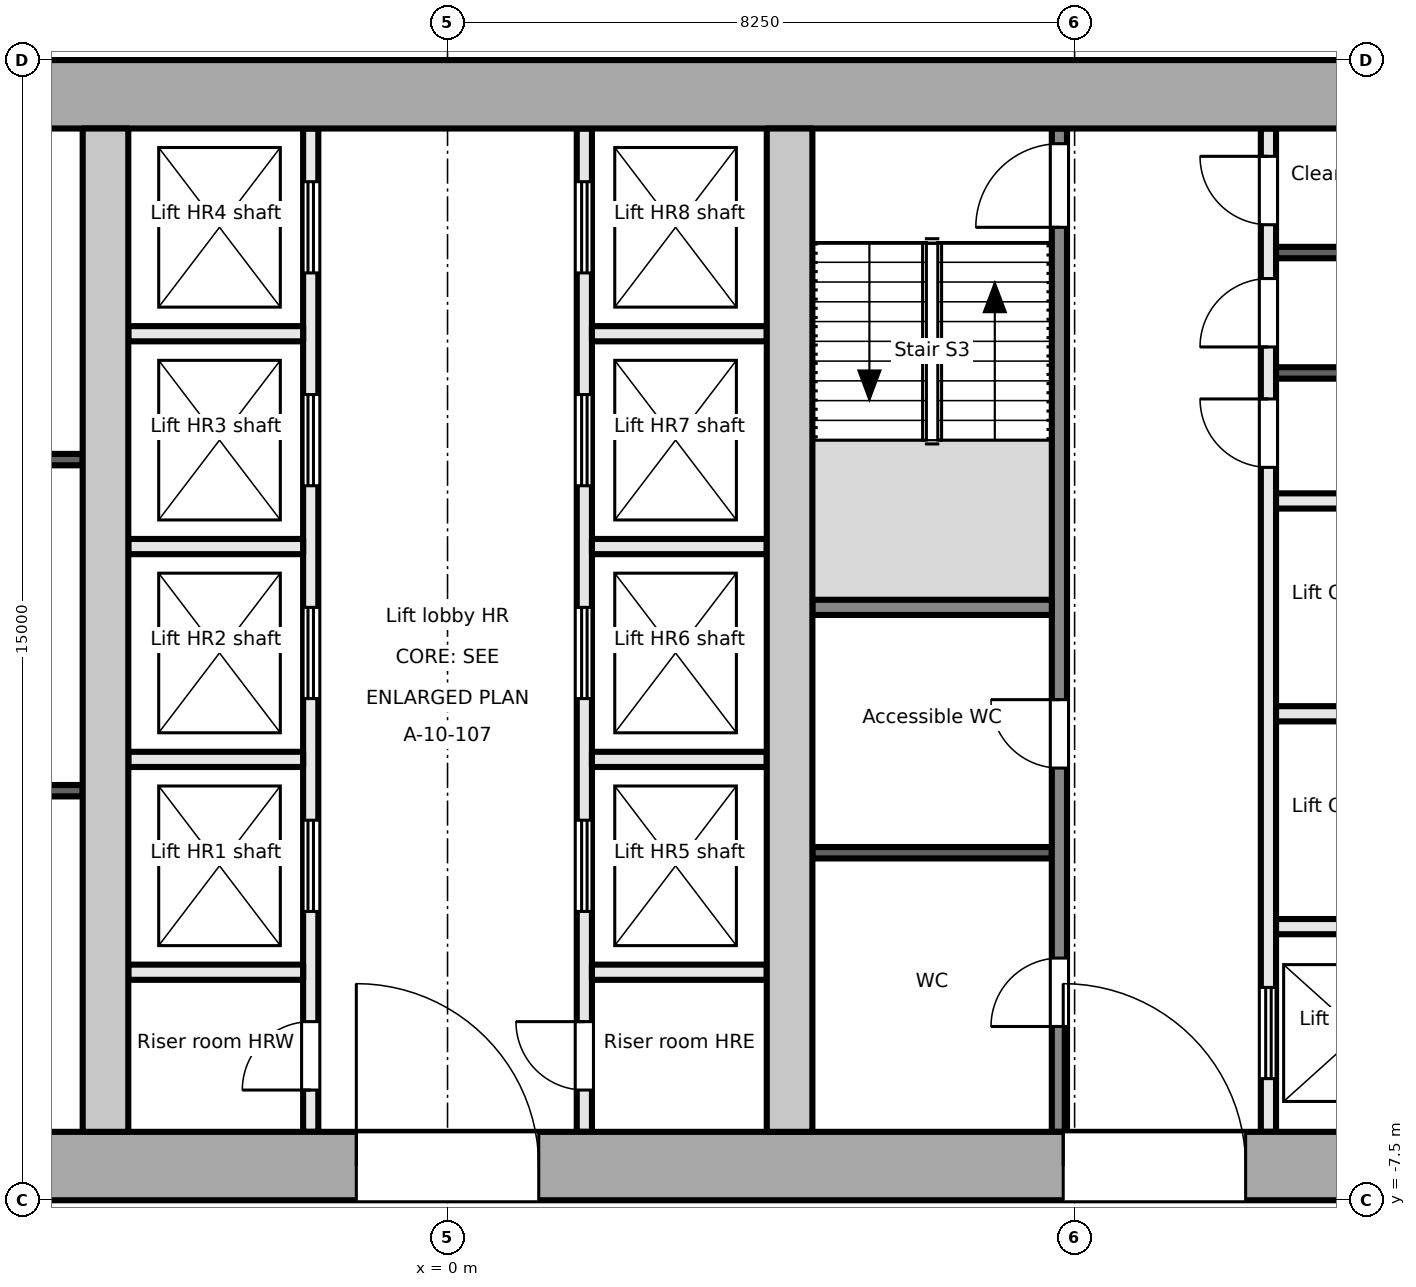
"""IFC4 building model, lengths in metres.
Left out: names, types, materials, properties, quantities, classifications, styles, units other than length and angle.
Written with IfcOpenShell. Run it as: python <this file> out.ifc"""

import sys

from ifc_helpers import new_model, si_unit, direction, frame, frame_2d, origin, place, context, subcontext, project, spatial, rectangle, extrude, element, fill, save


model = new_model("IFC4")
c1 = context("Model", 3, precision=1e-05, world=origin(), true_north=direction((0.0, 1.0)))
c2 = subcontext(c1, "Body", "Model", "MODEL_VIEW")
j1 = project(units=[si_unit("LENGTHUNIT", "METRE"), si_unit("PLANEANGLEUNIT", "RADIAN")], contexts=[c1])
p1 = place(None, origin())
s1 = spatial("IfcSite", under=j1, at=p1, CompositionType="ELEMENT")
p2 = place(p1, origin())
s2 = spatial("IfcBuilding", under=s1, at=p2, CompositionType="ELEMENT")
p3 = place(p2, frame((0.0, 0.0, 213.5)))
s3 = spatial("IfcBuildingStorey", under=s2, at=p3, CompositionType="ELEMENT", Elevation=213.5)
p4 = place(p3, frame((-18.0, -7.05, -0.2), z_axis=(0.0, 0.0, 1.0), x_axis=(1.0, 0.0, 0.0)))
e1 = element("IfcWall", 1, at=p4, inside=s3, PredefinedType="SHEAR", context=c2, shape_type="SweptSolid", body=[
    extrude(rectangle(XDim=36.0, YDim=0.9, at=frame_2d((18.0, 0.0))), origin(), (0.0, 0.0, 1.0), 3.9),
])
p5 = place(p4, frame((4.9, 0.0, 0.2)))
e2 = element("IfcOpeningElement", 2, at=p5, cuts=e1, PredefinedType="OPENING", context=c2, shape_type="SweptSolid", body=[
    extrude(rectangle(XDim=1.8, YDim=2.1, at=frame_2d((0.9, 1.05))), frame((0.0, 0.46, 0.0), z_axis=(0.0, -1.0, 0.0), x_axis=(1.0, 0.0, 0.0)), (0.0, 0.0, 1.0), 0.921),
])
p6 = place(p4, frame((16.8, 0.0, 0.2)))
e3 = element("IfcOpeningElement", 3, at=p6, cuts=e1, PredefinedType="OPENING", context=c2, shape_type="SweptSolid", body=[
    extrude(rectangle(XDim=2.4, YDim=2.1, at=frame_2d((1.2, 1.05))), frame((0.0, 0.46, 0.0), z_axis=(0.0, -1.0, 0.0), x_axis=(1.0, 0.0, 0.0)), (0.0, 0.0, 1.0), 0.921),
])
p7 = place(p4, frame((26.1, 0.0, 0.2)))
e4 = element("IfcOpeningElement", 4, at=p7, cuts=e1, PredefinedType="OPENING", context=c2, shape_type="SweptSolid", body=[
    extrude(rectangle(XDim=2.4, YDim=2.1, at=frame_2d((1.2, 1.05))), frame((0.0, 0.46, 0.0), z_axis=(0.0, -1.0, 0.0), x_axis=(1.0, 0.0, 0.0)), (0.0, 0.0, 1.0), 0.921),
])
p8 = place(p3, frame((-18.0, 7.05, -0.2), z_axis=(0.0, 0.0, 1.0), x_axis=(1.0, 0.0, 0.0)))
e5 = element("IfcWall", 5, at=p8, inside=s3, PredefinedType="SHEAR", context=c2, shape_type="SweptSolid", body=[
    extrude(rectangle(XDim=36.0, YDim=0.9, at=frame_2d((18.0, 0.0))), origin(), (0.0, 0.0, 1.0), 3.9),
])
for number, where, z_axis, x_axis in (
    (6, (-4.5, -6.6, -0.2), (0.0, 0.0, 1.0), (0.0, 1.0, 0.0)),
    (7, (4.5, -6.6, -0.2), (0.0, 0.0, 1.0), (0.0, 1.0, 0.0)),
):
    element("IfcWall", number, at=place(p3, frame(where, z_axis=z_axis, x_axis=x_axis)), inside=s3, PredefinedType="SHEAR", context=c2, shape_type="SweptSolid", body=[
        extrude(rectangle(XDim=13.2, YDim=0.6, at=frame_2d((6.6, 0.0))), origin(), (0.0, 0.0, 1.0), 3.9),
    ])
for number, where, z_axis, x_axis in (
    (8, (-11.05, -2.112, 0.0), (0.0, 0.0, 1.0), (1.0, 0.0, 0.0)),
    (9, (-11.05, 2.244, 0.0), (0.0, 0.0, 1.0), (1.0, 0.0, 0.0)),
):
    element("IfcWall", number, at=place(p3, frame(where, z_axis=z_axis, x_axis=x_axis)), inside=s3, PredefinedType="PARTITIONING", context=c2, shape_type="SweptSolid", body=[
        extrude(rectangle(XDim=6.25, YDim=0.15, at=frame_2d((3.125, 0.0))), origin(), (0.0, 0.0, 1.0), 3.7),
    ])
p9 = place(p3, frame((-1.8, -6.6, 0.0), z_axis=(0.0, 0.0, 1.0), x_axis=(0.0, 1.0, 0.0)))
e10 = element("IfcWall", 10, at=p9, inside=s3, PredefinedType="PARTITIONING", context=c2, shape_type="SweptSolid", body=[
    extrude(rectangle(XDim=13.2, YDim=0.2, at=frame_2d((6.6, 0.0))), origin(), (0.0, 0.0, 1.0), 3.7),
])
p10 = place(p9, frame((0.55, 0.0, 0.0)))
e11 = element("IfcOpeningElement", 11, at=p10, cuts=e10, PredefinedType="OPENING", context=c2, shape_type="SweptSolid", body=[
    extrude(rectangle(XDim=0.9, YDim=2.1, at=frame_2d((0.45, 1.05))), frame((0.0, 0.111, 0.0), z_axis=(0.0, -1.0, 0.0), x_axis=(1.0, 0.0, 0.0)), (0.0, 0.0, 1.0), 0.221),
])
p11 = place(p9, frame((2.9, 0.0, 0.0)))
e12 = element("IfcOpeningElement", 12, at=p11, cuts=e10, PredefinedType="OPENING", context=c2, shape_type="SweptSolid", body=[
    extrude(rectangle(XDim=1.2, YDim=2.1, at=frame_2d((0.6, 1.05))), frame((0.0, 0.111, 0.0), z_axis=(0.0, -1.0, 0.0), x_axis=(1.0, 0.0, 0.0)), (0.0, 0.0, 1.0), 0.221),
])
p12 = place(p9, frame((5.7, 0.0, 0.0)))
e13 = element("IfcOpeningElement", 13, at=p12, cuts=e10, PredefinedType="OPENING", context=c2, shape_type="SweptSolid", body=[
    extrude(rectangle(XDim=1.2, YDim=2.1, at=frame_2d((0.6, 1.05))), frame((0.0, 0.111, 0.0), z_axis=(0.0, -1.0, 0.0), x_axis=(1.0, 0.0, 0.0)), (0.0, 0.0, 1.0), 0.221),
])
p13 = place(p9, frame((8.5, 0.0, 0.0)))
e14 = element("IfcOpeningElement", 14, at=p13, cuts=e10, PredefinedType="OPENING", context=c2, shape_type="SweptSolid", body=[
    extrude(rectangle(XDim=1.2, YDim=2.1, at=frame_2d((0.6, 1.05))), frame((0.0, 0.111, 0.0), z_axis=(0.0, -1.0, 0.0), x_axis=(1.0, 0.0, 0.0)), (0.0, 0.0, 1.0), 0.221),
])
p14 = place(p9, frame((11.3, 0.0, 0.0)))
e15 = element("IfcOpeningElement", 15, at=p14, cuts=e10, PredefinedType="OPENING", context=c2, shape_type="SweptSolid", body=[
    extrude(rectangle(XDim=1.2, YDim=2.1, at=frame_2d((0.6, 1.05))), frame((0.0, 0.111, 0.0), z_axis=(0.0, -1.0, 0.0), x_axis=(1.0, 0.0, 0.0)), (0.0, 0.0, 1.0), 0.221),
])
p15 = place(p3, frame((1.8, -6.6, 0.0), z_axis=(0.0, 0.0, 1.0), x_axis=(0.0, 1.0, 0.0)))
e16 = element("IfcWall", 16, at=p15, inside=s3, PredefinedType="PARTITIONING", context=c2, shape_type="SweptSolid", body=[
    extrude(rectangle(XDim=13.2, YDim=0.2, at=frame_2d((6.6, 0.0))), origin(), (0.0, 0.0, 1.0), 3.7),
])
p16 = place(p15, frame((0.55, 0.0, 0.0)))
e17 = element("IfcOpeningElement", 17, at=p16, cuts=e16, PredefinedType="OPENING", context=c2, shape_type="SweptSolid", body=[
    extrude(rectangle(XDim=0.9, YDim=2.1, at=frame_2d((0.45, 1.05))), frame((0.0, 0.111, 0.0), z_axis=(0.0, -1.0, 0.0), x_axis=(1.0, 0.0, 0.0)), (0.0, 0.0, 1.0), 0.221),
])
p17 = place(p15, frame((2.9, 0.0, 0.0)))
e18 = element("IfcOpeningElement", 18, at=p17, cuts=e16, PredefinedType="OPENING", context=c2, shape_type="SweptSolid", body=[
    extrude(rectangle(XDim=1.2, YDim=2.1, at=frame_2d((0.6, 1.05))), frame((0.0, 0.111, 0.0), z_axis=(0.0, -1.0, 0.0), x_axis=(1.0, 0.0, 0.0)), (0.0, 0.0, 1.0), 0.221),
])
p18 = place(p15, frame((5.7, 0.0, 0.0)))
e19 = element("IfcOpeningElement", 19, at=p18, cuts=e16, PredefinedType="OPENING", context=c2, shape_type="SweptSolid", body=[
    extrude(rectangle(XDim=1.2, YDim=2.1, at=frame_2d((0.6, 1.05))), frame((0.0, 0.111, 0.0), z_axis=(0.0, -1.0, 0.0), x_axis=(1.0, 0.0, 0.0)), (0.0, 0.0, 1.0), 0.221),
])
p19 = place(p15, frame((8.5, 0.0, 0.0)))
e20 = element("IfcOpeningElement", 20, at=p19, cuts=e16, PredefinedType="OPENING", context=c2, shape_type="SweptSolid", body=[
    extrude(rectangle(XDim=1.2, YDim=2.1, at=frame_2d((0.6, 1.05))), frame((0.0, 0.111, 0.0), z_axis=(0.0, -1.0, 0.0), x_axis=(1.0, 0.0, 0.0)), (0.0, 0.0, 1.0), 0.221),
])
p20 = place(p15, frame((11.3, 0.0, 0.0)))
e21 = element("IfcOpeningElement", 21, at=p20, cuts=e16, PredefinedType="OPENING", context=c2, shape_type="SweptSolid", body=[
    extrude(rectangle(XDim=1.2, YDim=2.1, at=frame_2d((0.6, 1.05))), frame((0.0, 0.111, 0.0), z_axis=(0.0, -1.0, 0.0), x_axis=(1.0, 0.0, 0.0)), (0.0, 0.0, 1.0), 0.221),
])
for number, where, z_axis, x_axis in (
    (22, (-4.2, -1.7, 0.0), (0.0, 0.0, 1.0), (1.0, 0.0, 0.0)),
    (23, (-4.2, 1.1, 0.0), (0.0, 0.0, 1.0), (1.0, 0.0, 0.0)),
    (24, (-4.2, 3.9, 0.0), (0.0, 0.0, 1.0), (1.0, 0.0, 0.0)),
    (25, (-4.2, -4.5, 0.0), (0.0, 0.0, 1.0), (1.0, 0.0, 0.0)),
    (26, (1.9, -1.7, 0.0), (0.0, 0.0, 1.0), (1.0, 0.0, 0.0)),
    (27, (1.9, 1.1, 0.0), (0.0, 0.0, 1.0), (1.0, 0.0, 0.0)),
    (28, (1.9, 3.9, 0.0), (0.0, 0.0, 1.0), (1.0, 0.0, 0.0)),
    (29, (1.9, -4.5, 0.0), (0.0, 0.0, 1.0), (1.0, 0.0, 0.0)),
):
    element("IfcWall", number, at=place(p3, frame(where, z_axis=z_axis, x_axis=x_axis)), inside=s3, PredefinedType="PARTITIONING", context=c2, shape_type="SweptSolid", body=[
        extrude(rectangle(XDim=2.3, YDim=0.2, at=frame_2d((1.15, 0.0))), origin(), (0.0, 0.0, 1.0), 3.7),
    ])
p21 = place(p3, frame((8.05, -6.6, 0.0), z_axis=(0.0, 0.0, 1.0), x_axis=(0.0, 1.0, 0.0)))
e30 = element("IfcWall", 30, at=p21, inside=s3, PredefinedType="PARTITIONING", context=c2, shape_type="SweptSolid", body=[
    extrude(rectangle(XDim=13.2, YDim=0.2, at=frame_2d((6.6, 0.0))), origin(), (0.0, 0.0, 1.0), 3.7),
])
p22 = place(p21, frame((1.386, 0.0, 0.0)))
e31 = element("IfcOpeningElement", 31, at=p22, cuts=e30, PredefinedType="OPENING", context=c2, shape_type="SweptSolid", body=[
    extrude(rectangle(XDim=0.9, YDim=2.1, at=frame_2d((0.45, 1.05))), frame((0.0, 0.111, 0.0), z_axis=(0.0, -1.0, 0.0), x_axis=(1.0, 0.0, 0.0)), (0.0, 0.0, 1.0), 0.221),
])
p23 = place(p21, frame((4.786, 0.0, 0.0)))
e32 = element("IfcOpeningElement", 32, at=p23, cuts=e30, PredefinedType="OPENING", context=c2, shape_type="SweptSolid", body=[
    extrude(rectangle(XDim=0.9, YDim=2.1, at=frame_2d((0.45, 1.05))), frame((0.0, 0.111, 0.0), z_axis=(0.0, -1.0, 0.0), x_axis=(1.0, 0.0, 0.0)), (0.0, 0.0, 1.0), 0.221),
])
p24 = place(p21, frame((11.9, 0.0, 0.0)))
e33 = element("IfcOpeningElement", 33, at=p24, cuts=e30, PredefinedType="OPENING", context=c2, shape_type="SweptSolid", body=[
    extrude(rectangle(XDim=1.1, YDim=2.1, at=frame_2d((0.55, 1.05))), frame((0.0, 0.111, 0.0), z_axis=(0.0, -1.0, 0.0), x_axis=(1.0, 0.0, 0.0)), (0.0, 0.0, 1.0), 0.221),
])
p25 = place(p3, frame((10.8, -6.6, 0.0), z_axis=(0.0, 0.0, 1.0), x_axis=(0.0, 1.0, 0.0)))
e34 = element("IfcWall", 34, at=p25, inside=s3, PredefinedType="PARTITIONING", context=c2, shape_type="SweptSolid", body=[
    extrude(rectangle(XDim=13.2, YDim=0.2, at=frame_2d((6.6, 0.0))), origin(), (0.0, 0.0, 1.0), 3.7),
])
p26 = place(p25, frame((0.7, 0.0, 0.0)))
e35 = element("IfcOpeningElement", 35, at=p26, cuts=e34, PredefinedType="OPENING", context=c2, shape_type="SweptSolid", body=[
    extrude(rectangle(XDim=1.2, YDim=2.1, at=frame_2d((0.6, 1.05))), frame((0.0, 0.111, 0.0), z_axis=(0.0, -1.0, 0.0), x_axis=(1.0, 0.0, 0.0)), (0.0, 0.0, 1.0), 0.221),
])
p27 = place(p25, frame((8.742, 0.0, 0.0)))
e36 = element("IfcOpeningElement", 36, at=p27, cuts=e34, PredefinedType="OPENING", context=c2, shape_type="SweptSolid", body=[
    extrude(rectangle(XDim=0.9, YDim=2.1, at=frame_2d((0.45, 1.05))), frame((0.0, 0.111, 0.0), z_axis=(0.0, -1.0, 0.0), x_axis=(1.0, 0.0, 0.0)), (0.0, 0.0, 1.0), 0.221),
])
p28 = place(p25, frame((10.326, 0.0, 0.0)))
e37 = element("IfcOpeningElement", 37, at=p28, cuts=e34, PredefinedType="OPENING", context=c2, shape_type="SweptSolid", body=[
    extrude(rectangle(XDim=0.9, YDim=2.1, at=frame_2d((0.45, 1.05))), frame((0.0, 0.111, 0.0), z_axis=(0.0, -1.0, 0.0), x_axis=(1.0, 0.0, 0.0)), (0.0, 0.0, 1.0), 0.221),
])
p29 = place(p25, frame((11.934, 0.0, 0.0)))
e38 = element("IfcOpeningElement", 38, at=p29, cuts=e34, PredefinedType="OPENING", context=c2, shape_type="SweptSolid", body=[
    extrude(rectangle(XDim=0.9, YDim=2.1, at=frame_2d((0.45, 1.05))), frame((0.0, 0.111, 0.0), z_axis=(0.0, -1.0, 0.0), x_axis=(1.0, 0.0, 0.0)), (0.0, 0.0, 1.0), 0.221),
])
p30 = place(p3, frame((4.8, 0.3, 0.0), z_axis=(0.0, 0.0, 1.0), x_axis=(1.0, 0.0, 0.0)))
e39 = element("IfcWall", 39, at=p30, inside=s3, PredefinedType="PARTITIONING", context=c2, shape_type="SweptSolid", body=[
    extrude(rectangle(XDim=3.15, YDim=0.2, at=frame_2d((1.575, 0.0))), origin(), (0.0, 0.0, 1.0), 3.7),
])
p31 = place(p3, frame((4.8, -2.928, 0.0), z_axis=(0.0, 0.0, 1.0), x_axis=(1.0, 0.0, 0.0)))
e40 = element("IfcWall", 40, at=p31, inside=s3, PredefinedType="PARTITIONING", context=c2, shape_type="SweptSolid", body=[
    extrude(rectangle(XDim=3.15, YDim=0.15, at=frame_2d((1.575, 0.0))), origin(), (0.0, 0.0, 1.0), 3.7),
])
for number, where, z_axis, x_axis in (
    (41, (10.9, -3.9, 0.0), (0.0, 0.0, 1.0), (1.0, 0.0, 0.0)),
    (42, (10.9, -1.1, 0.0), (0.0, 0.0, 1.0), (1.0, 0.0, 0.0)),
    (43, (10.9, 1.7, 0.0), (0.0, 0.0, 1.0), (1.0, 0.0, 0.0)),
):
    element("IfcWall", number, at=place(p3, frame(where, z_axis=z_axis, x_axis=x_axis)), inside=s3, PredefinedType="PARTITIONING", context=c2, shape_type="SweptSolid", body=[
        extrude(rectangle(XDim=2.3, YDim=0.2, at=frame_2d((1.15, 0.0))), origin(), (0.0, 0.0, 1.0), 3.7),
    ])
for number, where, z_axis, x_axis in (
    (44, (10.9, 3.384, 0.0), (0.0, 0.0, 1.0), (1.0, 0.0, 0.0)),
    (45, (10.9, 4.968, 0.0), (0.0, 0.0, 1.0), (1.0, 0.0, 0.0)),
):
    element("IfcWall", number, at=place(p3, frame(where, z_axis=z_axis, x_axis=x_axis)), inside=s3, PredefinedType="PARTITIONING", context=c2, shape_type="SweptSolid", body=[
        extrude(rectangle(XDim=2.3, YDim=0.15, at=frame_2d((1.15, 0.0))), origin(), (0.0, 0.0, 1.0), 3.7),
    ])
p32 = place(p10, origin())
e46 = element("IfcDoor", 46, at=p32, inside=s3, OperationType="SINGLE_SWING_LEFT", PredefinedType="DOOR", context=c2, shape_type="SweptSolid", body=[
    extrude(rectangle(XDim=0.9, YDim=2.1, at=frame_2d((0.45, 1.05))), frame((0.0, 0.025, 0.0), z_axis=(0.0, -1.0, 0.0), x_axis=(1.0, 0.0, 0.0)), (0.0, 0.0, 1.0), 0.05),
])
fill(e11, e46)
p33 = place(p11, origin())
e47 = element("IfcDoor", 47, at=p33, inside=s3, OperationType="DOUBLE_DOOR_SLIDING", PredefinedType="DOOR", context=c2, shape_type="SweptSolid", body=[
    extrude(rectangle(XDim=1.2, YDim=2.1, at=frame_2d((0.6, 1.05))), frame((0.0, 0.025, 0.0), z_axis=(0.0, -1.0, 0.0), x_axis=(1.0, 0.0, 0.0)), (0.0, 0.0, 1.0), 0.05),
])
fill(e12, e47)
p34 = place(p12, origin())
e48 = element("IfcDoor", 48, at=p34, inside=s3, OperationType="DOUBLE_DOOR_SLIDING", PredefinedType="DOOR", context=c2, shape_type="SweptSolid", body=[
    extrude(rectangle(XDim=1.2, YDim=2.1, at=frame_2d((0.6, 1.05))), frame((0.0, 0.025, 0.0), z_axis=(0.0, -1.0, 0.0), x_axis=(1.0, 0.0, 0.0)), (0.0, 0.0, 1.0), 0.05),
])
fill(e13, e48)
p35 = place(p13, origin())
e49 = element("IfcDoor", 49, at=p35, inside=s3, OperationType="DOUBLE_DOOR_SLIDING", PredefinedType="DOOR", context=c2, shape_type="SweptSolid", body=[
    extrude(rectangle(XDim=1.2, YDim=2.1, at=frame_2d((0.6, 1.05))), frame((0.0, 0.025, 0.0), z_axis=(0.0, -1.0, 0.0), x_axis=(1.0, 0.0, 0.0)), (0.0, 0.0, 1.0), 0.05),
])
fill(e14, e49)
p36 = place(p14, origin())
e50 = element("IfcDoor", 50, at=p36, inside=s3, OperationType="DOUBLE_DOOR_SLIDING", PredefinedType="DOOR", context=c2, shape_type="SweptSolid", body=[
    extrude(rectangle(XDim=1.2, YDim=2.1, at=frame_2d((0.6, 1.05))), frame((0.0, 0.025, 0.0), z_axis=(0.0, -1.0, 0.0), x_axis=(1.0, 0.0, 0.0)), (0.0, 0.0, 1.0), 0.05),
])
fill(e15, e50)
p37 = place(p16, origin())
e51 = element("IfcDoor", 51, at=p37, inside=s3, OperationType="SINGLE_SWING_RIGHT", PredefinedType="DOOR", context=c2, shape_type="SweptSolid", body=[
    extrude(rectangle(XDim=0.9, YDim=2.1, at=frame_2d((0.45, 1.05))), frame((0.0, 0.025, 0.0), z_axis=(0.0, -1.0, 0.0), x_axis=(1.0, 0.0, 0.0)), (0.0, 0.0, 1.0), 0.05),
])
fill(e17, e51)
p38 = place(p17, origin())
e52 = element("IfcDoor", 52, at=p38, inside=s3, OperationType="DOUBLE_DOOR_SLIDING", PredefinedType="DOOR", context=c2, shape_type="SweptSolid", body=[
    extrude(rectangle(XDim=1.2, YDim=2.1, at=frame_2d((0.6, 1.05))), frame((0.0, 0.025, 0.0), z_axis=(0.0, -1.0, 0.0), x_axis=(1.0, 0.0, 0.0)), (0.0, 0.0, 1.0), 0.05),
])
fill(e18, e52)
p39 = place(p18, origin())
e53 = element("IfcDoor", 53, at=p39, inside=s3, OperationType="DOUBLE_DOOR_SLIDING", PredefinedType="DOOR", context=c2, shape_type="SweptSolid", body=[
    extrude(rectangle(XDim=1.2, YDim=2.1, at=frame_2d((0.6, 1.05))), frame((0.0, 0.025, 0.0), z_axis=(0.0, -1.0, 0.0), x_axis=(1.0, 0.0, 0.0)), (0.0, 0.0, 1.0), 0.05),
])
fill(e19, e53)
p40 = place(p19, origin())
e54 = element("IfcDoor", 54, at=p40, inside=s3, OperationType="DOUBLE_DOOR_SLIDING", PredefinedType="DOOR", context=c2, shape_type="SweptSolid", body=[
    extrude(rectangle(XDim=1.2, YDim=2.1, at=frame_2d((0.6, 1.05))), frame((0.0, 0.025, 0.0), z_axis=(0.0, -1.0, 0.0), x_axis=(1.0, 0.0, 0.0)), (0.0, 0.0, 1.0), 0.05),
])
fill(e20, e54)
p41 = place(p20, origin())
e55 = element("IfcDoor", 55, at=p41, inside=s3, OperationType="DOUBLE_DOOR_SLIDING", PredefinedType="DOOR", context=c2, shape_type="SweptSolid", body=[
    extrude(rectangle(XDim=1.2, YDim=2.1, at=frame_2d((0.6, 1.05))), frame((0.0, 0.025, 0.0), z_axis=(0.0, -1.0, 0.0), x_axis=(1.0, 0.0, 0.0)), (0.0, 0.0, 1.0), 0.05),
])
fill(e21, e55)
p42 = place(p6, origin())
e56 = element("IfcDoor", 56, at=p42, inside=s3, OperationType="DOUBLE_DOOR_DOUBLE_SWING", PredefinedType="DOOR", context=c2, shape_type="SweptSolid", body=[
    extrude(rectangle(XDim=2.4, YDim=2.1, at=frame_2d((1.2, 1.05))), frame((0.0, 0.025, 0.0), z_axis=(0.0, -1.0, 0.0), x_axis=(1.0, 0.0, 0.0)), (0.0, 0.0, 1.0), 0.05),
])
fill(e3, e56)
p43 = place(p22, origin())
e57 = element("IfcDoor", 57, at=p43, inside=s3, OperationType="SINGLE_SWING_LEFT", PredefinedType="DOOR", context=c2, shape_type="SweptSolid", body=[
    extrude(rectangle(XDim=0.9, YDim=2.1, at=frame_2d((0.45, 1.05))), frame((0.0, 0.025, 0.0), z_axis=(0.0, -1.0, 0.0), x_axis=(1.0, 0.0, 0.0)), (0.0, 0.0, 1.0), 0.05),
])
fill(e31, e57)
p44 = place(p23, origin())
e58 = element("IfcDoor", 58, at=p44, inside=s3, OperationType="SINGLE_SWING_RIGHT", PredefinedType="DOOR", context=c2, shape_type="SweptSolid", body=[
    extrude(rectangle(XDim=0.9, YDim=2.1, at=frame_2d((0.45, 1.05))), frame((0.0, 0.025, 0.0), z_axis=(0.0, -1.0, 0.0), x_axis=(1.0, 0.0, 0.0)), (0.0, 0.0, 1.0), 0.05),
])
fill(e32, e58)
p45 = place(p24, origin())
e59 = element("IfcDoor", 59, at=p45, inside=s3, OperationType="SINGLE_SWING_LEFT", PredefinedType="DOOR", context=c2, shape_type="SweptSolid", body=[
    extrude(rectangle(XDim=1.1, YDim=2.1, at=frame_2d((0.55, 1.05))), frame((0.0, 0.025, 0.0), z_axis=(0.0, -1.0, 0.0), x_axis=(1.0, 0.0, 0.0)), (0.0, 0.0, 1.0), 0.05),
])
fill(e33, e59)
p46 = place(p7, origin())
e60 = element("IfcDoor", 60, at=p46, inside=s3, OperationType="DOUBLE_DOOR_DOUBLE_SWING", PredefinedType="DOOR", context=c2, shape_type="SweptSolid", body=[
    extrude(rectangle(XDim=2.4, YDim=2.1, at=frame_2d((1.2, 1.05))), frame((0.0, 0.025, 0.0), z_axis=(0.0, -1.0, 0.0), x_axis=(1.0, 0.0, 0.0)), (0.0, 0.0, 1.0), 0.05),
])
fill(e4, e60)
p47 = place(p26, origin())
e61 = element("IfcDoor", 61, at=p47, inside=s3, OperationType="DOUBLE_DOOR_SLIDING", PredefinedType="DOOR", context=c2, shape_type="SweptSolid", body=[
    extrude(rectangle(XDim=1.2, YDim=2.1, at=frame_2d((0.6, 1.05))), frame((0.0, 0.025, 0.0), z_axis=(0.0, -1.0, 0.0), x_axis=(1.0, 0.0, 0.0)), (0.0, 0.0, 1.0), 0.05),
])
fill(e35, e61)
p48 = place(p27, origin())
e62 = element("IfcDoor", 62, at=p48, inside=s3, OperationType="SINGLE_SWING_RIGHT", PredefinedType="DOOR", context=c2, shape_type="SweptSolid", body=[
    extrude(rectangle(XDim=0.9, YDim=2.1, at=frame_2d((0.45, 1.05))), frame((0.0, 0.025, 0.0), z_axis=(0.0, -1.0, 0.0), x_axis=(1.0, 0.0, 0.0)), (0.0, 0.0, 1.0), 0.05),
])
fill(e36, e62)
p49 = place(p28, origin())
e63 = element("IfcDoor", 63, at=p49, inside=s3, OperationType="SINGLE_SWING_LEFT", PredefinedType="DOOR", context=c2, shape_type="SweptSolid", body=[
    extrude(rectangle(XDim=0.9, YDim=2.1, at=frame_2d((0.45, 1.05))), frame((0.0, 0.025, 0.0), z_axis=(0.0, -1.0, 0.0), x_axis=(1.0, 0.0, 0.0)), (0.0, 0.0, 1.0), 0.05),
])
fill(e37, e63)
p50 = place(p29, origin())
e64 = element("IfcDoor", 64, at=p50, inside=s3, OperationType="SINGLE_SWING_RIGHT", PredefinedType="DOOR", context=c2, shape_type="SweptSolid", body=[
    extrude(rectangle(XDim=0.9, YDim=2.1, at=frame_2d((0.45, 1.05))), frame((0.0, 0.025, 0.0), z_axis=(0.0, -1.0, 0.0), x_axis=(1.0, 0.0, 0.0)), (0.0, 0.0, 1.0), 0.05),
])
fill(e38, e64)
save(model, sys.argv[1])
